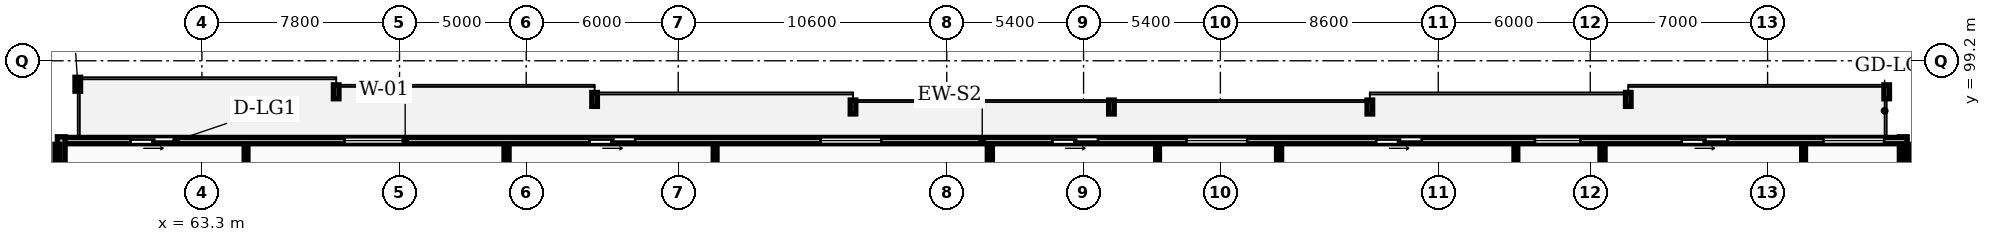
"""IFC4 building model, lengths in metres.
Left out: names, types, materials, properties, quantities, classifications, styles, units other than length and angle.
Written with IfcOpenShell. Run it as: python <this file> out.ifc"""

import sys

from ifc_helpers import new_model, si_unit, direction, frame, frame_2d, origin, place, context, subcontext, project, spatial, rectangle, extrude, element, fill, save


model = new_model("IFC4")
c1 = context("Model", 3, precision=1e-05, world=origin(), true_north=direction((0.0, 1.0)))
c2 = subcontext(c1, "Body", "Model", "MODEL_VIEW")
j1 = project(units=[si_unit("LENGTHUNIT", "METRE"), si_unit("PLANEANGLEUNIT", "RADIAN")], contexts=[c1])
p1 = place(None, origin())
s1 = spatial("IfcSite", under=j1, at=p1, CompositionType="ELEMENT")
p2 = place(p1, origin())
s2 = spatial("IfcBuilding", under=s1, at=p2, CompositionType="ELEMENT")
p3 = place(p2, frame((0.0, 0.0, 113.3)))
s3 = spatial("IfcBuildingStorey", under=s2, at=p3, CompositionType="ELEMENT", Elevation=113.3)
p4 = place(p3, frame((130.45, 92.6, 0.0), z_axis=(0.0, 0.0, 1.0), x_axis=(0.0, 1.0, 0.0)))
e1 = element("IfcWall", 1, at=p4, inside=s3, PredefinedType="STANDARD", context=c2, shape_type="SweptSolid", body=[
    extrude(rectangle(XDim=3.6, YDim=0.3, at=frame_2d((1.8, 0.0))), origin(), (0.0, 0.0, 1.0), 2.97),
])
p5 = place(p3, frame((130.6, 96.05, 0.0), z_axis=(0.0, 0.0, 1.0), x_axis=(-1.0, 0.0, 0.0)))
e2 = element("IfcWall", 2, at=p5, inside=s3, PredefinedType="STANDARD", context=c2, shape_type="SweptSolid", body=[
    extrude(rectangle(XDim=73.0, YDim=0.25, at=frame_2d((36.5, 0.0))), origin(), (0.0, 0.0, 1.0), 2.97),
])
p6 = place(p5, frame((68.319, 0.0, 0.0)))
e3 = element("IfcOpeningElement", 3, at=p6, cuts=e2, PredefinedType="OPENING", context=c2, shape_type="SweptSolid", body=[
    extrude(rectangle(XDim=1.8, YDim=2.2, at=frame_2d((0.9, 1.1))), frame((0.0, 0.135, 0.0), z_axis=(0.0, -1.0, 0.0), x_axis=(1.0, 0.0, 0.0)), (0.0, 0.0, 1.0), 0.27),
])
p7 = place(p5, frame((59.277, 0.0, 0.85)))
e4 = element("IfcOpeningElement", 4, at=p7, cuts=e2, PredefinedType="OPENING", context=c2, shape_type="SweptSolid", body=[
    extrude(rectangle(XDim=2.4, YDim=1.9, at=frame_2d((1.2, 0.95))), frame((0.0, 0.135, 0.0), z_axis=(0.0, -1.0, 0.0), x_axis=(1.0, 0.0, 0.0)), (0.0, 0.0, 1.0), 0.27),
])
p8 = place(p5, frame((50.199, 0.0, 0.0)))
e5 = element("IfcOpeningElement", 5, at=p8, cuts=e2, PredefinedType="OPENING", context=c2, shape_type="SweptSolid", body=[
    extrude(rectangle(XDim=1.8, YDim=2.2, at=frame_2d((0.9, 1.1))), frame((0.0, 0.135, 0.0), z_axis=(0.0, -1.0, 0.0), x_axis=(1.0, 0.0, 0.0)), (0.0, 0.0, 1.0), 0.27),
])
p9 = place(p5, frame((40.481, 0.0, 0.85)))
e6 = element("IfcOpeningElement", 6, at=p9, cuts=e2, PredefinedType="OPENING", context=c2, shape_type="SweptSolid", body=[
    extrude(rectangle(XDim=2.4, YDim=1.9, at=frame_2d((1.2, 0.95))), frame((0.0, 0.135, 0.0), z_axis=(0.0, -1.0, 0.0), x_axis=(1.0, 0.0, 0.0)), (0.0, 0.0, 1.0), 0.27),
])
p10 = place(p5, frame((31.93, 0.0, 0.0)))
e7 = element("IfcOpeningElement", 7, at=p10, cuts=e2, PredefinedType="OPENING", context=c2, shape_type="SweptSolid", body=[
    extrude(rectangle(XDim=1.8, YDim=2.2, at=frame_2d((0.9, 1.1))), frame((0.0, 0.135, 0.0), z_axis=(0.0, -1.0, 0.0), x_axis=(1.0, 0.0, 0.0)), (0.0, 0.0, 1.0), 0.27),
])
p11 = place(p5, frame((26.042, 0.0, 0.85)))
e8 = element("IfcOpeningElement", 8, at=p11, cuts=e2, PredefinedType="OPENING", context=c2, shape_type="SweptSolid", body=[
    extrude(rectangle(XDim=2.4, YDim=1.9, at=frame_2d((1.2, 0.95))), frame((0.0, 0.135, 0.0), z_axis=(0.0, -1.0, 0.0), x_axis=(1.0, 0.0, 0.0)), (0.0, 0.0, 1.0), 0.27),
])
p12 = place(p5, frame((19.15, 0.0, 0.0)))
e9 = element("IfcOpeningElement", 9, at=p12, cuts=e2, PredefinedType="OPENING", context=c2, shape_type="SweptSolid", body=[
    extrude(rectangle(XDim=1.8, YDim=2.2, at=frame_2d((0.9, 1.1))), frame((0.0, 0.135, 0.0), z_axis=(0.0, -1.0, 0.0), x_axis=(1.0, 0.0, 0.0)), (0.0, 0.0, 1.0), 0.27),
])
p13 = place(p5, frame((12.886, 0.0, 0.85)))
e10 = element("IfcOpeningElement", 10, at=p13, cuts=e2, PredefinedType="OPENING", context=c2, shape_type="SweptSolid", body=[
    extrude(rectangle(XDim=1.8, YDim=1.8, at=frame_2d((0.9, 0.9))), frame((0.0, 0.135, 0.0), z_axis=(0.0, -1.0, 0.0), x_axis=(1.0, 0.0, 0.0)), (0.0, 0.0, 1.0), 0.27),
])
p14 = place(p5, frame((7.088, 0.0, 0.0)))
e11 = element("IfcOpeningElement", 11, at=p14, cuts=e2, PredefinedType="OPENING", context=c2, shape_type="SweptSolid", body=[
    extrude(rectangle(XDim=1.8, YDim=2.2, at=frame_2d((0.9, 1.1))), frame((0.0, 0.135, 0.0), z_axis=(0.0, -1.0, 0.0), x_axis=(1.0, 0.0, 0.0)), (0.0, 0.0, 1.0), 0.27),
])
p15 = place(p5, frame((0.9, 0.0, 0.85)))
e12 = element("IfcOpeningElement", 12, at=p15, cuts=e2, PredefinedType="OPENING", context=c2, shape_type="SweptSolid", body=[
    extrude(rectangle(XDim=2.4, YDim=1.9, at=frame_2d((1.2, 0.95))), frame((0.0, 0.135, 0.0), z_axis=(0.0, -1.0, 0.0), x_axis=(1.0, 0.0, 0.0)), (0.0, 0.0, 1.0), 0.27),
])
p16 = place(p3, frame((57.75, 96.2, 0.0), z_axis=(0.0, 0.0, 1.0), x_axis=(0.0, -1.0, 0.0)))
e13 = element("IfcWall", 13, at=p16, inside=s3, PredefinedType="STANDARD", context=c2, shape_type="SweptSolid", body=[
    extrude(rectangle(XDim=3.6, YDim=0.3, at=frame_2d((1.8, 0.0))), origin(), (0.0, 0.0, 1.0), 2.97),
])
for number, where, z_axis, x_axis in (
    (14, (57.6, 69.83, 0.0), (0.0, 0.0, 1.0), (0.0, 1.0, 0.0)),
    (15, (130.6, 69.83, 0.0), (0.0, 0.0, 1.0), (0.0, 1.0, 0.0)),
    (16, (75.325, 69.83, 0.0), (0.0, 0.0, 1.0), (0.0, 1.0, 0.0)),
):
    element("IfcWall", number, at=place(p3, frame(where, z_axis=z_axis, x_axis=x_axis)), inside=s3, PredefinedType="PARTITIONING", context=c2, shape_type="SweptSolid", body=[
        extrude(rectangle(XDim=26.07, YDim=0.2, at=frame_2d((13.035, 0.0))), origin(), (0.0, 0.0, 1.0), 2.97),
    ])
p17 = place(p3, frame((65.042, 90.73, 0.0), z_axis=(0.0, 0.0, 1.0), x_axis=(0.0, 1.0, 0.0)))
e17 = element("IfcWall", 17, at=p17, inside=s3, PredefinedType="PARTITIONING", context=c2, shape_type="SweptSolid", body=[
    extrude(rectangle(XDim=5.17, YDim=0.15, at=frame_2d((2.585, 0.0))), origin(), (0.0, 0.0, 1.0), 2.97),
])
p18 = place(p3, frame((94.401, 69.83, 0.0), z_axis=(0.0, 0.0, 1.0), x_axis=(0.0, 1.0, 0.0)))
e18 = element("IfcWall", 18, at=p18, inside=s3, PredefinedType="PARTITIONING", context=c2, shape_type="SweptSolid", body=[
    extrude(rectangle(XDim=26.07, YDim=0.2, at=frame_2d((13.035, 0.0))), origin(), (0.0, 0.0, 1.0), 2.97),
])
p19 = place(p3, frame((83.558, 90.73, 0.0), z_axis=(0.0, 0.0, 1.0), x_axis=(0.0, 1.0, 0.0)))
e19 = element("IfcWall", 19, at=p19, inside=s3, PredefinedType="PARTITIONING", context=c2, shape_type="SweptSolid", body=[
    extrude(rectangle(XDim=5.17, YDim=0.15, at=frame_2d((2.585, 0.0))), origin(), (0.0, 0.0, 1.0), 2.97),
])
p20 = place(p3, frame((105.817, 69.83, 0.0), z_axis=(0.0, 0.0, 1.0), x_axis=(0.0, 1.0, 0.0)))
e20 = element("IfcWall", 20, at=p20, inside=s3, PredefinedType="PARTITIONING", context=c2, shape_type="SweptSolid", body=[
    extrude(rectangle(XDim=26.07, YDim=0.2, at=frame_2d((13.035, 0.0))), origin(), (0.0, 0.0, 1.0), 2.97),
])
p21 = place(p3, frame((101.02, 85.59, 0.0), z_axis=(0.0, 0.0, 1.0), x_axis=(0.0, 1.0, 0.0)))
e21 = element("IfcWall", 21, at=p21, inside=s3, PredefinedType="PARTITIONING", context=c2, shape_type="SweptSolid", body=[
    extrude(rectangle(XDim=10.31, YDim=0.15, at=frame_2d((5.155, 0.0))), origin(), (0.0, 0.0, 1.0), 2.97),
])
p22 = place(p21, frame((1.43, 0.0, 0.0)))
e22 = element("IfcOpeningElement", 22, at=p22, cuts=e21, PredefinedType="OPENING", context=c2, shape_type="SweptSolid", body=[
    extrude(rectangle(XDim=0.84, YDim=2.04, at=frame_2d((0.42, 1.02))), frame((0.0, 0.085, 0.0), z_axis=(0.0, -1.0, 0.0), x_axis=(1.0, 0.0, 0.0)), (0.0, 0.0, 1.0), 0.17),
])
p23 = place(p21, frame((3.102, 0.0, 0.0)))
e23 = element("IfcOpeningElement", 23, at=p23, cuts=e21, PredefinedType="OPENING", context=c2, shape_type="SweptSolid", body=[
    extrude(rectangle(XDim=0.84, YDim=2.04, at=frame_2d((0.42, 1.02))), frame((0.0, 0.085, 0.0), z_axis=(0.0, -1.0, 0.0), x_axis=(1.0, 0.0, 0.0)), (0.0, 0.0, 1.0), 0.17),
])
p24 = place(p21, frame((7.29, 0.0, 0.0)))
e24 = element("IfcOpeningElement", 24, at=p24, cuts=e21, PredefinedType="OPENING", context=c2, shape_type="SweptSolid", body=[
    extrude(rectangle(XDim=0.88, YDim=2.06, at=frame_2d((0.44, 1.03))), frame((0.0, 0.085, 0.0), z_axis=(0.0, -1.0, 0.0), x_axis=(1.0, 0.0, 0.0)), (0.0, 0.0, 1.0), 0.17),
])
p25 = place(p3, frame((118.584, 69.83, 0.0), z_axis=(0.0, 0.0, 1.0), x_axis=(0.0, 1.0, 0.0)))
e25 = element("IfcWall", 25, at=p25, inside=s3, PredefinedType="PARTITIONING", context=c2, shape_type="SweptSolid", body=[
    extrude(rectangle(XDim=26.07, YDim=0.2, at=frame_2d((13.035, 0.0))), origin(), (0.0, 0.0, 1.0), 2.97),
])
p26 = place(p3, frame((115.164, 85.59, 0.0), z_axis=(0.0, 0.0, 1.0), x_axis=(0.0, 1.0, 0.0)))
e26 = element("IfcWall", 26, at=p26, inside=s3, PredefinedType="PARTITIONING", context=c2, shape_type="SweptSolid", body=[
    extrude(rectangle(XDim=10.31, YDim=0.15, at=frame_2d((5.155, 0.0))), origin(), (0.0, 0.0, 1.0), 2.97),
])
p27 = place(p26, frame((1.43, 0.0, 0.0)))
e27 = element("IfcOpeningElement", 27, at=p27, cuts=e26, PredefinedType="OPENING", context=c2, shape_type="SweptSolid", body=[
    extrude(rectangle(XDim=0.84, YDim=2.04, at=frame_2d((0.42, 1.02))), frame((0.0, 0.085, 0.0), z_axis=(0.0, -1.0, 0.0), x_axis=(1.0, 0.0, 0.0)), (0.0, 0.0, 1.0), 0.17),
])
p28 = place(p26, frame((3.92, 0.0, 0.0)))
e28 = element("IfcOpeningElement", 28, at=p28, cuts=e26, PredefinedType="OPENING", context=c2, shape_type="SweptSolid", body=[
    extrude(rectangle(XDim=0.84, YDim=2.04, at=frame_2d((0.42, 1.02))), frame((0.0, 0.085, 0.0), z_axis=(0.0, -1.0, 0.0), x_axis=(1.0, 0.0, 0.0)), (0.0, 0.0, 1.0), 0.17),
])
p29 = place(p26, frame((5.48, 0.0, 0.0)))
e29 = element("IfcOpeningElement", 29, at=p29, cuts=e26, PredefinedType="OPENING", context=c2, shape_type="SweptSolid", body=[
    extrude(rectangle(XDim=0.88, YDim=2.06, at=frame_2d((0.44, 1.03))), frame((0.0, 0.085, 0.0), z_axis=(0.0, -1.0, 0.0), x_axis=(1.0, 0.0, 0.0)), (0.0, 0.0, 1.0), 0.17),
])
p30 = place(p3, frame((126.52, 85.59, 0.0), z_axis=(0.0, 0.0, 1.0), x_axis=(0.0, 1.0, 0.0)))
e30 = element("IfcWall", 30, at=p30, inside=s3, PredefinedType="PARTITIONING", context=c2, shape_type="SweptSolid", body=[
    extrude(rectangle(XDim=10.31, YDim=0.15, at=frame_2d((5.155, 0.0))), origin(), (0.0, 0.0, 1.0), 2.97),
])
p31 = place(p30, frame((1.43, 0.0, 0.0)))
e31 = element("IfcOpeningElement", 31, at=p31, cuts=e30, PredefinedType="OPENING", context=c2, shape_type="SweptSolid", body=[
    extrude(rectangle(XDim=0.84, YDim=2.04, at=frame_2d((0.42, 1.02))), frame((0.0, 0.085, 0.0), z_axis=(0.0, -1.0, 0.0), x_axis=(1.0, 0.0, 0.0)), (0.0, 0.0, 1.0), 0.17),
])
p32 = place(p30, frame((3.102, 0.0, 0.0)))
e32 = element("IfcOpeningElement", 32, at=p32, cuts=e30, PredefinedType="OPENING", context=c2, shape_type="SweptSolid", body=[
    extrude(rectangle(XDim=0.84, YDim=2.04, at=frame_2d((0.42, 1.02))), frame((0.0, 0.085, 0.0), z_axis=(0.0, -1.0, 0.0), x_axis=(1.0, 0.0, 0.0)), (0.0, 0.0, 1.0), 0.17),
])
p33 = place(p30, frame((7.29, 0.0, 0.0)))
e33 = element("IfcOpeningElement", 33, at=p33, cuts=e30, PredefinedType="OPENING", context=c2, shape_type="SweptSolid", body=[
    extrude(rectangle(XDim=0.88, YDim=2.06, at=frame_2d((0.44, 1.03))), frame((0.0, 0.085, 0.0), z_axis=(0.0, -1.0, 0.0), x_axis=(1.0, 0.0, 0.0)), (0.0, 0.0, 1.0), 0.17),
])
p34 = place(p6, origin())
e34 = element("IfcDoor", 34, at=p34, inside=s3, OperationType="SLIDING_TO_LEFT", PredefinedType="DOOR", context=c2, shape_type="SweptSolid", body=[
    extrude(rectangle(XDim=1.8, YDim=2.2, at=frame_2d((0.9, 1.1))), frame((0.0, 0.025, 0.0), z_axis=(0.0, -1.0, 0.0), x_axis=(1.0, 0.0, 0.0)), (0.0, 0.0, 1.0), 0.05),
])
fill(e3, e34)
p35 = place(p7, origin())
e35 = element("IfcWindow", 35, at=p35, inside=s3, PartitioningType="DOUBLE_PANEL_VERTICAL", PredefinedType="WINDOW", context=c2, shape_type="SweptSolid", body=[
    extrude(rectangle(XDim=2.4, YDim=1.9, at=frame_2d((1.2, 0.95))), frame((0.0, 0.03, 0.0), z_axis=(0.0, -1.0, 0.0), x_axis=(1.0, 0.0, 0.0)), (0.0, 0.0, 1.0), 0.06),
])
fill(e4, e35)
p36 = place(p8, origin())
e36 = element("IfcDoor", 36, at=p36, inside=s3, OperationType="SLIDING_TO_LEFT", PredefinedType="DOOR", context=c2, shape_type="SweptSolid", body=[
    extrude(rectangle(XDim=1.8, YDim=2.2, at=frame_2d((0.9, 1.1))), frame((0.0, 0.025, 0.0), z_axis=(0.0, -1.0, 0.0), x_axis=(1.0, 0.0, 0.0)), (0.0, 0.0, 1.0), 0.05),
])
fill(e5, e36)
p37 = place(p9, origin())
e37 = element("IfcWindow", 37, at=p37, inside=s3, PartitioningType="DOUBLE_PANEL_VERTICAL", PredefinedType="WINDOW", context=c2, shape_type="SweptSolid", body=[
    extrude(rectangle(XDim=2.4, YDim=1.9, at=frame_2d((1.2, 0.95))), frame((0.0, 0.03, 0.0), z_axis=(0.0, -1.0, 0.0), x_axis=(1.0, 0.0, 0.0)), (0.0, 0.0, 1.0), 0.06),
])
fill(e6, e37)
p38 = place(p10, origin())
e38 = element("IfcDoor", 38, at=p38, inside=s3, OperationType="SLIDING_TO_LEFT", PredefinedType="DOOR", context=c2, shape_type="SweptSolid", body=[
    extrude(rectangle(XDim=1.8, YDim=2.2, at=frame_2d((0.9, 1.1))), frame((0.0, 0.025, 0.0), z_axis=(0.0, -1.0, 0.0), x_axis=(1.0, 0.0, 0.0)), (0.0, 0.0, 1.0), 0.05),
])
fill(e7, e38)
p39 = place(p11, origin())
e39 = element("IfcWindow", 39, at=p39, inside=s3, PartitioningType="DOUBLE_PANEL_VERTICAL", PredefinedType="WINDOW", context=c2, shape_type="SweptSolid", body=[
    extrude(rectangle(XDim=2.4, YDim=1.9, at=frame_2d((1.2, 0.95))), frame((0.0, 0.03, 0.0), z_axis=(0.0, -1.0, 0.0), x_axis=(1.0, 0.0, 0.0)), (0.0, 0.0, 1.0), 0.06),
])
fill(e8, e39)
p40 = place(p12, origin())
e40 = element("IfcDoor", 40, at=p40, inside=s3, OperationType="SLIDING_TO_LEFT", PredefinedType="DOOR", context=c2, shape_type="SweptSolid", body=[
    extrude(rectangle(XDim=1.8, YDim=2.2, at=frame_2d((0.9, 1.1))), frame((0.0, 0.025, 0.0), z_axis=(0.0, -1.0, 0.0), x_axis=(1.0, 0.0, 0.0)), (0.0, 0.0, 1.0), 0.05),
])
fill(e9, e40)
p41 = place(p13, origin())
e41 = element("IfcWindow", 41, at=p41, inside=s3, PartitioningType="SINGLE_PANEL", PredefinedType="WINDOW", context=c2, shape_type="SweptSolid", body=[
    extrude(rectangle(XDim=1.8, YDim=1.8, at=frame_2d((0.9, 0.9))), frame((0.0, 0.03, 0.0), z_axis=(0.0, -1.0, 0.0), x_axis=(1.0, 0.0, 0.0)), (0.0, 0.0, 1.0), 0.06),
])
fill(e10, e41)
p42 = place(p14, origin())
e42 = element("IfcDoor", 42, at=p42, inside=s3, OperationType="SLIDING_TO_LEFT", PredefinedType="DOOR", context=c2, shape_type="SweptSolid", body=[
    extrude(rectangle(XDim=1.8, YDim=2.2, at=frame_2d((0.9, 1.1))), frame((0.0, 0.025, 0.0), z_axis=(0.0, -1.0, 0.0), x_axis=(1.0, 0.0, 0.0)), (0.0, 0.0, 1.0), 0.05),
])
fill(e11, e42)
p43 = place(p15, origin())
e43 = element("IfcWindow", 43, at=p43, inside=s3, PartitioningType="DOUBLE_PANEL_VERTICAL", PredefinedType="WINDOW", context=c2, shape_type="SweptSolid", body=[
    extrude(rectangle(XDim=2.4, YDim=1.9, at=frame_2d((1.2, 0.95))), frame((0.0, 0.03, 0.0), z_axis=(0.0, -1.0, 0.0), x_axis=(1.0, 0.0, 0.0)), (0.0, 0.0, 1.0), 0.06),
])
fill(e12, e43)
save(model, sys.argv[1])
